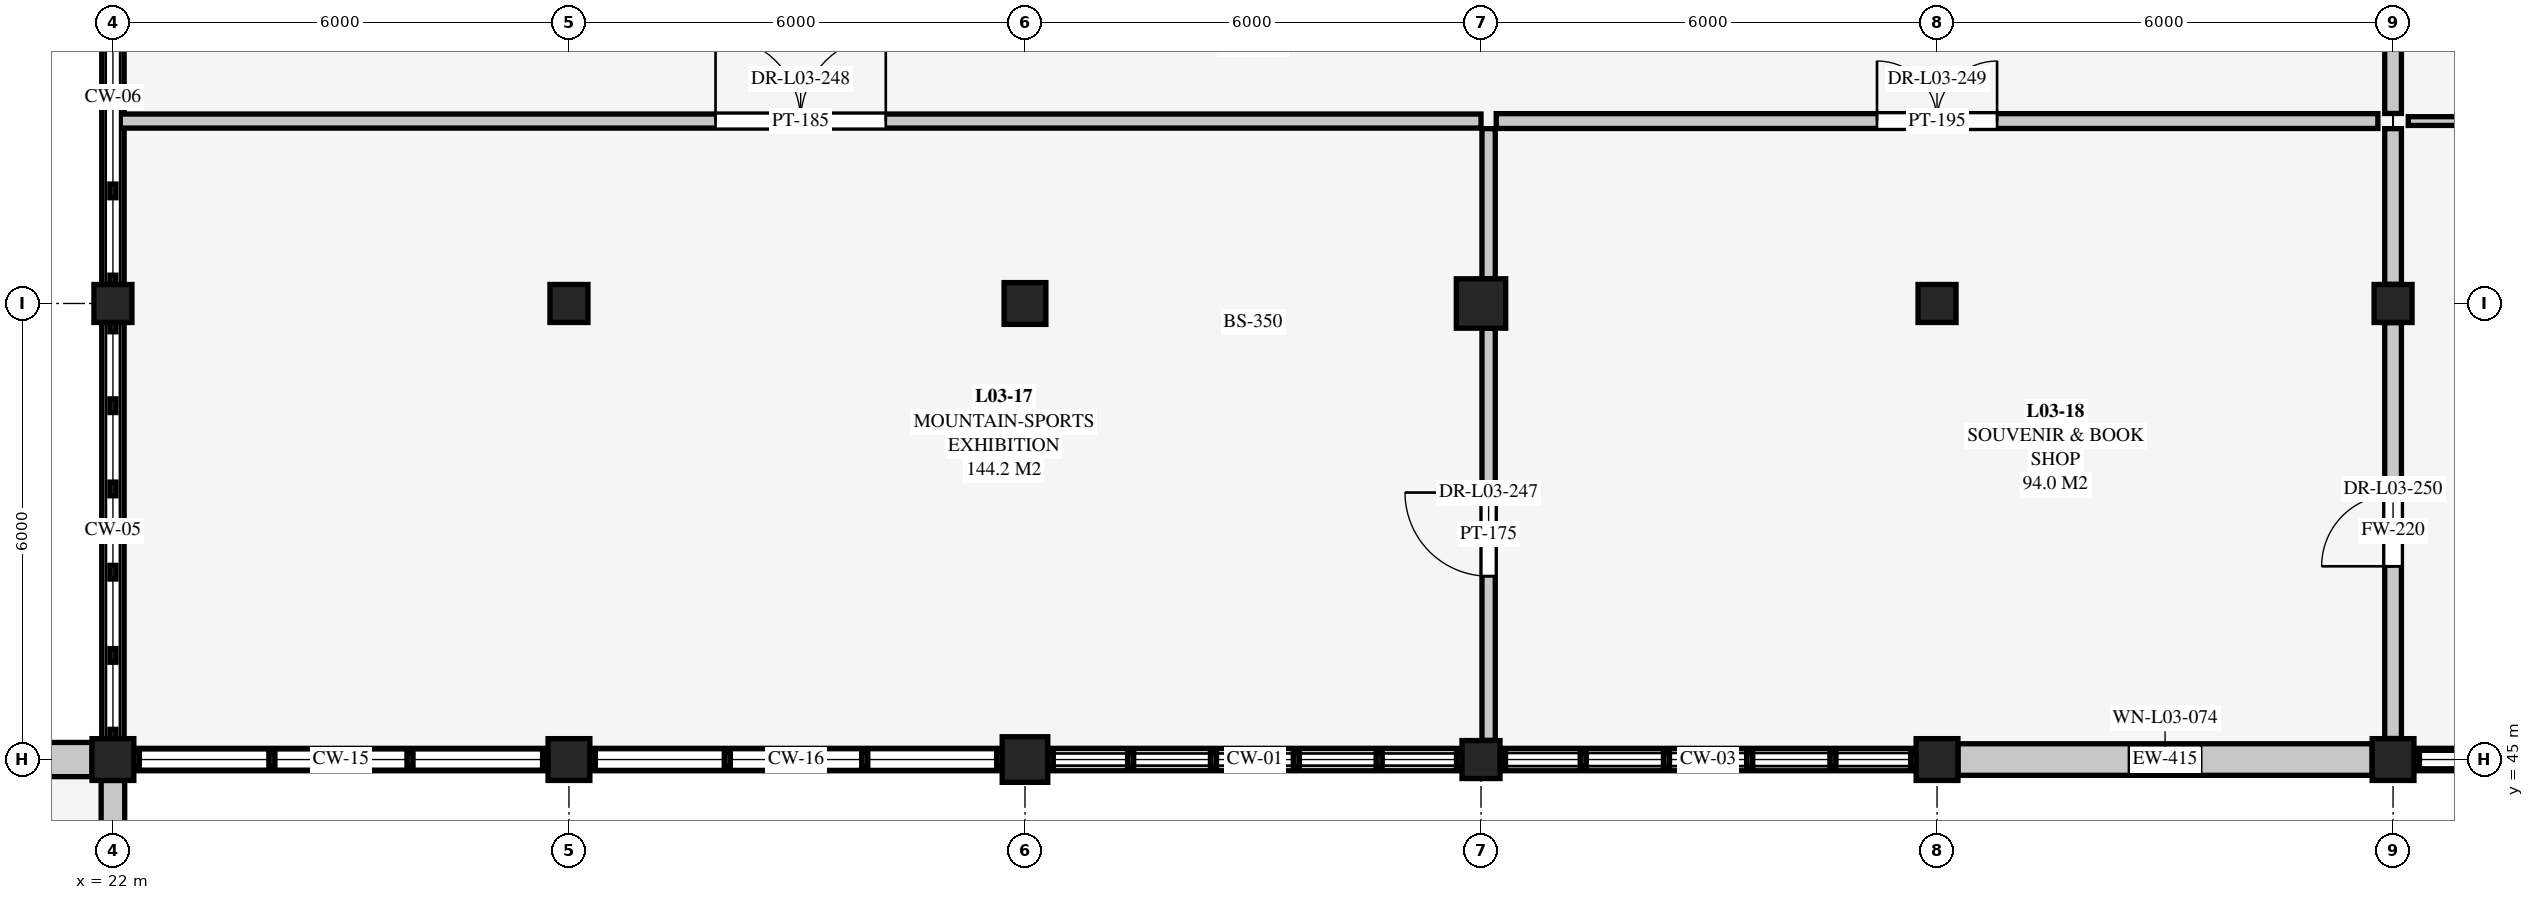
"""IFC4 building model, lengths in metres.
Left out: names, types, materials, properties, quantities, classifications, styles, units other than length and angle.
Written with IfcOpenShell. Run it as: python <this file> out.ifc"""

import sys

from ifc_helpers import new_model, si_unit, direction, frame, frame_2d, origin, origin_2d, place, context, subcontext, project, spatial, rectangle, extrude, element, fill, save


model = new_model("IFC4")
c1 = context("Model", 3, precision=1e-05, world=origin(), true_north=direction((0.0, 1.0)))
c2 = subcontext(c1, "Body", "Model", "MODEL_VIEW")
j1 = project(units=[si_unit("LENGTHUNIT", "METRE"), si_unit("PLANEANGLEUNIT", "RADIAN")], contexts=[c1])
p1 = place(None, origin())
s1 = spatial("IfcSite", under=j1, at=p1, CompositionType="ELEMENT")
p2 = place(p1, origin())
s2 = spatial("IfcBuilding", under=s1, at=p2, CompositionType="ELEMENT")
p3 = place(p2, frame((0.0, 0.0, 9.0)))
s3 = spatial("IfcBuildingStorey", under=s2, at=p3, CompositionType="ELEMENT", Elevation=9.0)
p4 = place(p3, frame((22.0, 45.0, 0.0), z_axis=(0.0, 0.0, 1.0), x_axis=(1.0, 0.0, 0.0)))
e1 = element("IfcColumn", 1, at=p4, inside=s3, PredefinedType="COLUMN", context=c2, shape_type="SweptSolid", body=[
    extrude(rectangle(XDim=0.55, YDim=0.55, at=origin_2d()), origin(), (0.0, 0.0, 1.0), 4.5),
])
p5 = place(p3, frame((22.0, 51.0, 0.0), z_axis=(0.0, 0.0, 1.0), x_axis=(1.0, 0.0, 0.0)))
e2 = element("IfcColumn", 2, at=p5, inside=s3, PredefinedType="COLUMN", context=c2, shape_type="SweptSolid", body=[
    extrude(rectangle(XDim=0.5, YDim=0.5, at=origin_2d()), origin(), (0.0, 0.0, 1.0), 4.5),
])
p6 = place(p3, frame((28.0, 45.0, 0.0), z_axis=(0.0, 0.0, 1.0), x_axis=(1.0, 0.0, 0.0)))
e3 = element("IfcColumn", 3, at=p6, inside=s3, PredefinedType="COLUMN", context=c2, shape_type="SweptSolid", body=[
    extrude(rectangle(XDim=0.55, YDim=0.55, at=origin_2d()), origin(), (0.0, 0.0, 1.0), 4.5),
])
p7 = place(p3, frame((28.0, 51.0, 0.0), z_axis=(0.0, 0.0, 1.0), x_axis=(1.0, 0.0, 0.0)))
e4 = element("IfcColumn", 4, at=p7, inside=s3, PredefinedType="COLUMN", context=c2, shape_type="SweptSolid", body=[
    extrude(rectangle(XDim=0.5, YDim=0.5, at=origin_2d()), origin(), (0.0, 0.0, 1.0), 4.5),
])
p8 = place(p3, frame((34.0, 45.0, 0.0), z_axis=(0.0, 0.0, 1.0), x_axis=(1.0, 0.0, 0.0)))
e5 = element("IfcColumn", 5, at=p8, inside=s3, PredefinedType="COLUMN", context=c2, shape_type="SweptSolid", body=[
    extrude(rectangle(XDim=0.6, YDim=0.6, at=origin_2d()), origin(), (0.0, 0.0, 1.0), 4.5),
])
p9 = place(p3, frame((34.0, 51.0, 0.0), z_axis=(0.0, 0.0, 1.0), x_axis=(1.0, 0.0, 0.0)))
e6 = element("IfcColumn", 6, at=p9, inside=s3, PredefinedType="COLUMN", context=c2, shape_type="SweptSolid", body=[
    extrude(rectangle(XDim=0.55, YDim=0.55, at=origin_2d()), origin(), (0.0, 0.0, 1.0), 4.5),
])
p10 = place(p3, frame((40.0, 45.0, 0.0), z_axis=(0.0, 0.0, 1.0), x_axis=(1.0, 0.0, 0.0)))
e7 = element("IfcColumn", 7, at=p10, inside=s3, PredefinedType="COLUMN", context=c2, shape_type="SweptSolid", body=[
    extrude(rectangle(XDim=0.5, YDim=0.5, at=origin_2d()), origin(), (0.0, 0.0, 1.0), 4.5),
])
p11 = place(p3, frame((40.0, 51.0, 0.0), z_axis=(0.0, 0.0, 1.0), x_axis=(1.0, 0.0, 0.0)))
e8 = element("IfcColumn", 8, at=p11, inside=s3, PredefinedType="COLUMN", context=c2, shape_type="SweptSolid", body=[
    extrude(rectangle(XDim=0.65, YDim=0.65, at=origin_2d()), origin(), (0.0, 0.0, 1.0), 4.5),
])
p12 = place(p3, frame((46.0, 45.0, 0.0), z_axis=(0.0, 0.0, 1.0), x_axis=(1.0, 0.0, 0.0)))
e9 = element("IfcColumn", 9, at=p12, inside=s3, PredefinedType="COLUMN", context=c2, shape_type="SweptSolid", body=[
    extrude(rectangle(XDim=0.55, YDim=0.55, at=origin_2d()), origin(), (0.0, 0.0, 1.0), 4.5),
])
p13 = place(p3, frame((46.0, 51.0, 0.0), z_axis=(0.0, 0.0, 1.0), x_axis=(1.0, 0.0, 0.0)))
e10 = element("IfcColumn", 10, at=p13, inside=s3, PredefinedType="COLUMN", context=c2, shape_type="SweptSolid", body=[
    extrude(rectangle(XDim=0.5, YDim=0.5, at=origin_2d()), origin(), (0.0, 0.0, 1.0), 4.5),
])
p14 = place(p3, frame((52.0, 45.0, 0.0), z_axis=(0.0, 0.0, 1.0), x_axis=(1.0, 0.0, 0.0)))
e11 = element("IfcColumn", 11, at=p14, inside=s3, PredefinedType="COLUMN", context=c2, shape_type="SweptSolid", body=[
    extrude(rectangle(XDim=0.55, YDim=0.55, at=origin_2d()), origin(), (0.0, 0.0, 1.0), 4.5),
])
p15 = place(p3, frame((52.0, 51.0, 0.0), z_axis=(0.0, 0.0, 1.0), x_axis=(1.0, 0.0, 0.0)))
e12 = element("IfcColumn", 12, at=p15, inside=s3, PredefinedType="COLUMN", context=c2, shape_type="SweptSolid", body=[
    extrude(rectangle(XDim=0.5, YDim=0.5, at=origin_2d()), origin(), (0.0, 0.0, 1.0), 4.5),
])
p16 = place(p3, frame((16.25, 45.0, 0.0), z_axis=(0.0, 0.0, 1.0), x_axis=(1.0, 0.0, 0.0)))
e13 = element("IfcWall", 13, at=p16, inside=s3, PredefinedType="SOLIDWALL", context=c2, shape_type="SweptSolid", body=[
    extrude(rectangle(XDim=5.475, YDim=0.45, at=frame_2d((2.738, 0.0))), origin(), (0.0, 0.0, 1.0), 3.893),
])
p17 = place(p16, frame((1.788, 0.0, 1.2)))
e14 = element("IfcOpeningElement", 14, at=p17, cuts=e13, PredefinedType="OPENING", context=c2, shape_type="SweptSolid", body=[
    extrude(rectangle(XDim=1.9, YDim=1.55, at=frame_2d((0.95, 0.775))), frame((0.0, 0.235, 0.0), z_axis=(0.0, -1.0, 0.0), x_axis=(1.0, 0.0, 0.0)), (0.0, 0.0, 1.0), 0.47),
])
p18 = place(p3, frame((22.0, 44.725, 0.0), z_axis=(0.0, 0.0, 1.0), x_axis=(0.0, -1.0, 0.0)))
e15 = element("IfcWall", 15, at=p18, inside=s3, PredefinedType="SOLIDWALL", context=c2, shape_type="SweptSolid", body=[
    extrude(rectangle(XDim=5.425, YDim=0.31, at=frame_2d((2.712, 0.0))), origin(), (0.0, 0.0, 1.0), 3.893),
])
p19 = place(p18, frame((1.688, 0.0, 1.2)))
e16 = element("IfcOpeningElement", 16, at=p19, cuts=e15, PredefinedType="OPENING", context=c2, shape_type="SweptSolid", body=[
    extrude(rectangle(XDim=2.05, YDim=1.55, at=frame_2d((1.025, 0.775))), frame((0.0, 0.165, 0.0), z_axis=(0.0, -1.0, 0.0), x_axis=(1.0, 0.0, 0.0)), (0.0, 0.0, 1.0), 0.33),
])
p20 = place(p3, frame((27.725, 45.0, 0.0), z_axis=(0.0, 0.0, 1.0), x_axis=(-1.0, 0.0, 0.0)))
e17 = element("IfcWall", 17, at=p20, inside=s3, PredefinedType="SOLIDWALL", context=c2, shape_type="SweptSolid", body=[
    extrude(rectangle(XDim=5.45, YDim=0.295, at=frame_2d((2.725, 0.0))), origin(), (0.0, 0.0, 1.0), 0.46),
])
p21 = place(p3, frame((33.7, 45.0, 0.0), z_axis=(0.0, 0.0, 1.0), x_axis=(-1.0, 0.0, 0.0)))
e18 = element("IfcWall", 18, at=p21, inside=s3, PredefinedType="SOLIDWALL", context=c2, shape_type="SweptSolid", body=[
    extrude(rectangle(XDim=5.425, YDim=0.295, at=frame_2d((2.712, 0.0))), origin(), (0.0, 0.0, 1.0), 0.52),
])
p22 = place(p3, frame((39.75, 45.0, 0.0), z_axis=(0.0, 0.0, 1.0), x_axis=(-1.0, 0.0, 0.0)))
e19 = element("IfcWall", 19, at=p22, inside=s3, PredefinedType="SOLIDWALL", context=c2, shape_type="SweptSolid", body=[
    extrude(rectangle(XDim=5.45, YDim=0.295, at=frame_2d((2.725, 0.0))), origin(), (0.0, 0.0, 1.0), 0.16),
])
p23 = place(p3, frame((45.725, 45.0, 0.0), z_axis=(0.0, 0.0, 1.0), x_axis=(-1.0, 0.0, 0.0)))
e20 = element("IfcWall", 20, at=p23, inside=s3, PredefinedType="SOLIDWALL", context=c2, shape_type="SweptSolid", body=[
    extrude(rectangle(XDim=5.475, YDim=0.295, at=frame_2d((2.738, 0.0))), origin(), (0.0, 0.0, 1.0), 0.26),
])
p24 = place(p3, frame((51.725, 45.0, 0.0), z_axis=(0.0, 0.0, 1.0), x_axis=(-1.0, 0.0, 0.0)))
e21 = element("IfcWall", 21, at=p24, inside=s3, PredefinedType="SOLIDWALL", context=c2, shape_type="SweptSolid", body=[
    extrude(rectangle(XDim=5.45, YDim=0.415, at=frame_2d((2.725, 0.0))), origin(), (0.0, 0.0, 1.0), 3.869),
])
p25 = place(p24, frame((2.25, 0.0, 0.9)))
e22 = element("IfcOpeningElement", 22, at=p25, cuts=e21, PredefinedType="OPENING", context=c2, shape_type="SweptSolid", body=[
    extrude(rectangle(XDim=0.95, YDim=1.95, at=frame_2d((0.475, 0.975))), frame((0.0, 0.218, 0.0), z_axis=(0.0, -1.0, 0.0), x_axis=(1.0, 0.0, 0.0)), (0.0, 0.0, 1.0), 0.435),
])
p26 = place(p3, frame((22.0, 45.275, 0.0), z_axis=(0.0, 0.0, 1.0), x_axis=(0.0, 1.0, 0.0)))
e23 = element("IfcWall", 23, at=p26, inside=s3, PredefinedType="SOLIDWALL", context=c2, shape_type="SweptSolid", body=[
    extrude(rectangle(XDim=5.475, YDim=0.295, at=frame_2d((2.738, 0.0))), origin(), (0.0, 0.0, 1.0), 0.36),
])
p27 = place(p3, frame((22.0, 51.25, 0.0), z_axis=(0.0, 0.0, 1.0), x_axis=(0.0, 1.0, 0.0)))
e24 = element("IfcWall", 24, at=p27, inside=s3, PredefinedType="SOLIDWALL", context=c2, shape_type="SweptSolid", body=[
    extrude(rectangle(XDim=4.925, YDim=0.295, at=frame_2d((2.462, 0.0))), origin(), (0.0, 0.0, 1.0), 0.41),
])
p28 = place(p3, frame((57.675, 45.0, 0.0), z_axis=(0.0, 0.0, 1.0), x_axis=(-1.0, 0.0, 0.0)))
e25 = element("IfcWall", 25, at=p28, inside=s3, PredefinedType="SOLIDWALL", context=c2, shape_type="SweptSolid", body=[
    extrude(rectangle(XDim=5.4, YDim=0.295, at=frame_2d((2.7, 0.0))), origin(), (0.0, 0.0, 1.0), 0.16),
])
p29 = place(p3, frame((40.1, 45.252, 0.0), z_axis=(0.0, 0.0, 1.0), x_axis=(0.0, 1.0, 0.0)))
e26 = element("IfcWall", 26, at=p29, inside=s3, PredefinedType="PARTITIONING", context=c2, shape_type="SweptSolid", body=[
    extrude(rectangle(XDim=5.421, YDim=0.175, at=frame_2d((2.71, 0.0))), origin(), (0.0, 0.0, 1.0), 3.692),
])
p30 = place(p29, frame((2.16, 0.0, 0.0)))
e27 = element("IfcOpeningElement", 27, at=p30, cuts=e26, PredefinedType="OPENING", context=c2, shape_type="SweptSolid", body=[
    extrude(rectangle(XDim=1.1, YDim=2.2, at=frame_2d((0.55, 1.1))), frame((0.0, 0.097, 0.0), z_axis=(0.0, -1.0, 0.0), x_axis=(1.0, 0.0, 0.0)), (0.0, 0.0, 1.0), 0.195),
])
p31 = place(p3, frame((40.1, 51.327, 0.0), z_axis=(0.0, 0.0, 1.0), x_axis=(0.0, 1.0, 0.0)))
e28 = element("IfcWall", 28, at=p31, inside=s3, PredefinedType="PARTITIONING", context=c2, shape_type="SweptSolid", body=[
    extrude(rectangle(XDim=1.973, YDim=0.175, at=frame_2d((0.987, 0.0))), origin(), (0.0, 0.0, 1.0), 4.3),
])
p32 = place(p3, frame((22.097, 53.4, 0.0), z_axis=(0.0, 0.0, 1.0), x_axis=(1.0, 0.0, 0.0)))
e29 = element("IfcWall", 29, at=p32, inside=s3, PredefinedType="PARTITIONING", context=c2, shape_type="SweptSolid", body=[
    extrude(rectangle(XDim=17.903, YDim=0.185, at=frame_2d((8.952, 0.0))), origin(), (0.0, 0.0, 1.0), 4.3),
])
p33 = place(p32, frame((7.832, 0.0, 0.0)))
e30 = element("IfcOpeningElement", 30, at=p33, cuts=e29, PredefinedType="OPENING", context=c2, shape_type="SweptSolid", body=[
    extrude(rectangle(XDim=2.24, YDim=2.4, at=frame_2d((1.12, 1.2))), frame((0.0, 0.103, 0.0), z_axis=(0.0, -1.0, 0.0), x_axis=(1.0, 0.0, 0.0)), (0.0, 0.0, 1.0), 0.205),
])
p34 = place(p3, frame((40.2, 53.4, 0.0), z_axis=(0.0, 0.0, 1.0), x_axis=(1.0, 0.0, 0.0)))
e31 = element("IfcWall", 31, at=p34, inside=s3, PredefinedType="PARTITIONING", context=c2, shape_type="SweptSolid", body=[
    extrude(rectangle(XDim=11.6, YDim=0.195, at=frame_2d((5.8, 0.0))), origin(), (0.0, 0.0, 1.0), 4.3),
])
p35 = place(p34, frame((5.01, 0.0, 0.0)))
e32 = element("IfcOpeningElement", 32, at=p35, cuts=e31, PredefinedType="OPENING", context=c2, shape_type="SweptSolid", body=[
    extrude(rectangle(XDim=1.58, YDim=2.2, at=frame_2d((0.79, 1.1))), frame((0.0, 0.108, 0.0), z_axis=(0.0, -1.0, 0.0), x_axis=(1.0, 0.0, 0.0)), (0.0, 0.0, 1.0), 0.215),
])
p36 = place(p3, frame((52.0, 45.277, 0.0), z_axis=(0.0, 0.0, 1.0), x_axis=(0.0, 1.0, 0.0)))
e33 = element("IfcWall", 33, at=p36, inside=s3, PredefinedType="SOLIDWALL", context=c2, shape_type="SweptSolid", body=[
    extrude(rectangle(XDim=5.471, YDim=0.22, at=frame_2d((2.735, 0.0))), origin(), (0.0, 0.0, 1.0), 3.819),
])
p37 = place(p36, frame((2.265, 0.0, 0.0)))
e34 = element("IfcOpeningElement", 34, at=p37, cuts=e33, PredefinedType="OPENING", context=c2, shape_type="SweptSolid", body=[
    extrude(rectangle(XDim=0.94, YDim=2.1, at=frame_2d((0.47, 1.05))), frame((0.0, 0.12, 0.0), z_axis=(0.0, -1.0, 0.0), x_axis=(1.0, 0.0, 0.0)), (0.0, 0.0, 1.0), 0.24),
])
p38 = place(p3, frame((52.0, 51.252, 0.0), z_axis=(0.0, 0.0, 1.0), x_axis=(0.0, 1.0, 0.0)))
e35 = element("IfcWall", 35, at=p38, inside=s3, PredefinedType="SOLIDWALL", context=c2, shape_type="SweptSolid", body=[
    extrude(rectangle(XDim=2.048, YDim=0.22, at=frame_2d((1.024, 0.0))), origin(), (0.0, 0.0, 1.0), 3.886),
])
p39 = place(p3, frame((52.0, 53.5, 0.0), z_axis=(0.0, 0.0, 1.0), x_axis=(0.0, 1.0, 0.0)))
e36 = element("IfcWall", 36, at=p39, inside=s3, PredefinedType="SOLIDWALL", context=c2, shape_type="SweptSolid", body=[
    extrude(rectangle(XDim=2.673, YDim=0.22, at=frame_2d((1.336, 0.0))), origin(), (0.0, 0.0, 1.0), 3.886),
])
p40 = place(p39, frame((0.866, 0.0, 0.0)))
e37 = element("IfcOpeningElement", 37, at=p40, cuts=e36, PredefinedType="OPENING", context=c2, shape_type="SweptSolid", body=[
    extrude(rectangle(XDim=0.94, YDim=2.1, at=frame_2d((0.47, 1.05))), frame((0.0, 0.12, 0.0), z_axis=(0.0, -1.0, 0.0), x_axis=(1.0, 0.0, 0.0)), (0.0, 0.0, 1.0), 0.24),
])
p41 = place(p3, frame((52.2, 53.4, 0.0), z_axis=(0.0, 0.0, 1.0), x_axis=(1.0, 0.0, 0.0)))
e38 = element("IfcWall", 38, at=p41, inside=s3, PredefinedType="PARTITIONING", context=c2, shape_type="SweptSolid", body=[
    extrude(rectangle(XDim=11.6, YDim=0.115, at=frame_2d((5.8, 0.0))), origin(), (0.0, 0.0, 1.0), 4.276),
])
p42 = place(p41, frame((4.68, 0.0, 0.0)))
e39 = element("IfcOpeningElement", 39, at=p42, cuts=e38, PredefinedType="OPENING", context=c2, shape_type="SweptSolid", body=[
    extrude(rectangle(XDim=2.24, YDim=2.4, at=frame_2d((1.12, 1.2))), frame((0.0, 0.068, 0.0), z_axis=(0.0, -1.0, 0.0), x_axis=(1.0, 0.0, 0.0)), (0.0, 0.0, 1.0), 0.135),
])
p43 = place(p25, origin())
e40 = element("IfcWindow", 40, at=p43, inside=s3, PartitioningType="SINGLE_PANEL", PredefinedType="WINDOW", context=c2, shape_type="SweptSolid", body=[
    extrude(rectangle(XDim=0.95, YDim=1.95, at=frame_2d((0.475, 0.975))), frame((0.0, 0.03, 0.0), z_axis=(0.0, -1.0, 0.0), x_axis=(1.0, 0.0, 0.0)), (0.0, 0.0, 1.0), 0.06),
])
fill(e22, e40)
p44 = place(p30, origin())
e41 = element("IfcDoor", 41, at=p44, inside=s3, OperationType="SINGLE_SWING_RIGHT", PredefinedType="DOOR", context=c2, shape_type="SweptSolid", body=[
    extrude(rectangle(XDim=1.1, YDim=2.2, at=frame_2d((0.55, 1.1))), frame((0.0, 0.025, 0.0), z_axis=(0.0, -1.0, 0.0), x_axis=(1.0, 0.0, 0.0)), (0.0, 0.0, 1.0), 0.05),
])
fill(e27, e41)
p45 = place(p33, origin())
e42 = element("IfcDoor", 42, at=p45, inside=s3, OperationType="DOUBLE_DOOR_SINGLE_SWING", PredefinedType="DOOR", context=c2, shape_type="SweptSolid", body=[
    extrude(rectangle(XDim=2.24, YDim=2.4, at=frame_2d((1.12, 1.2))), frame((0.0, 0.025, 0.0), z_axis=(0.0, -1.0, 0.0), x_axis=(1.0, 0.0, 0.0)), (0.0, 0.0, 1.0), 0.05),
])
fill(e30, e42)
p46 = place(p35, origin())
e43 = element("IfcDoor", 43, at=p46, inside=s3, OperationType="DOUBLE_DOOR_SINGLE_SWING", PredefinedType="DOOR", context=c2, shape_type="SweptSolid", body=[
    extrude(rectangle(XDim=1.58, YDim=2.2, at=frame_2d((0.79, 1.1))), frame((0.0, 0.025, 0.0), z_axis=(0.0, -1.0, 0.0), x_axis=(1.0, 0.0, 0.0)), (0.0, 0.0, 1.0), 0.05),
])
fill(e32, e43)
p47 = place(p37, origin())
e44 = element("IfcDoor", 44, at=p47, inside=s3, OperationType="SINGLE_SWING_LEFT", PredefinedType="DOOR", context=c2, shape_type="SweptSolid", body=[
    extrude(rectangle(XDim=0.94, YDim=2.1, at=frame_2d((0.47, 1.05))), frame((0.0, 0.025, 0.0), z_axis=(0.0, -1.0, 0.0), x_axis=(1.0, 0.0, 0.0)), (0.0, 0.0, 1.0), 0.05),
])
fill(e34, e44)
save(model, sys.argv[1])
